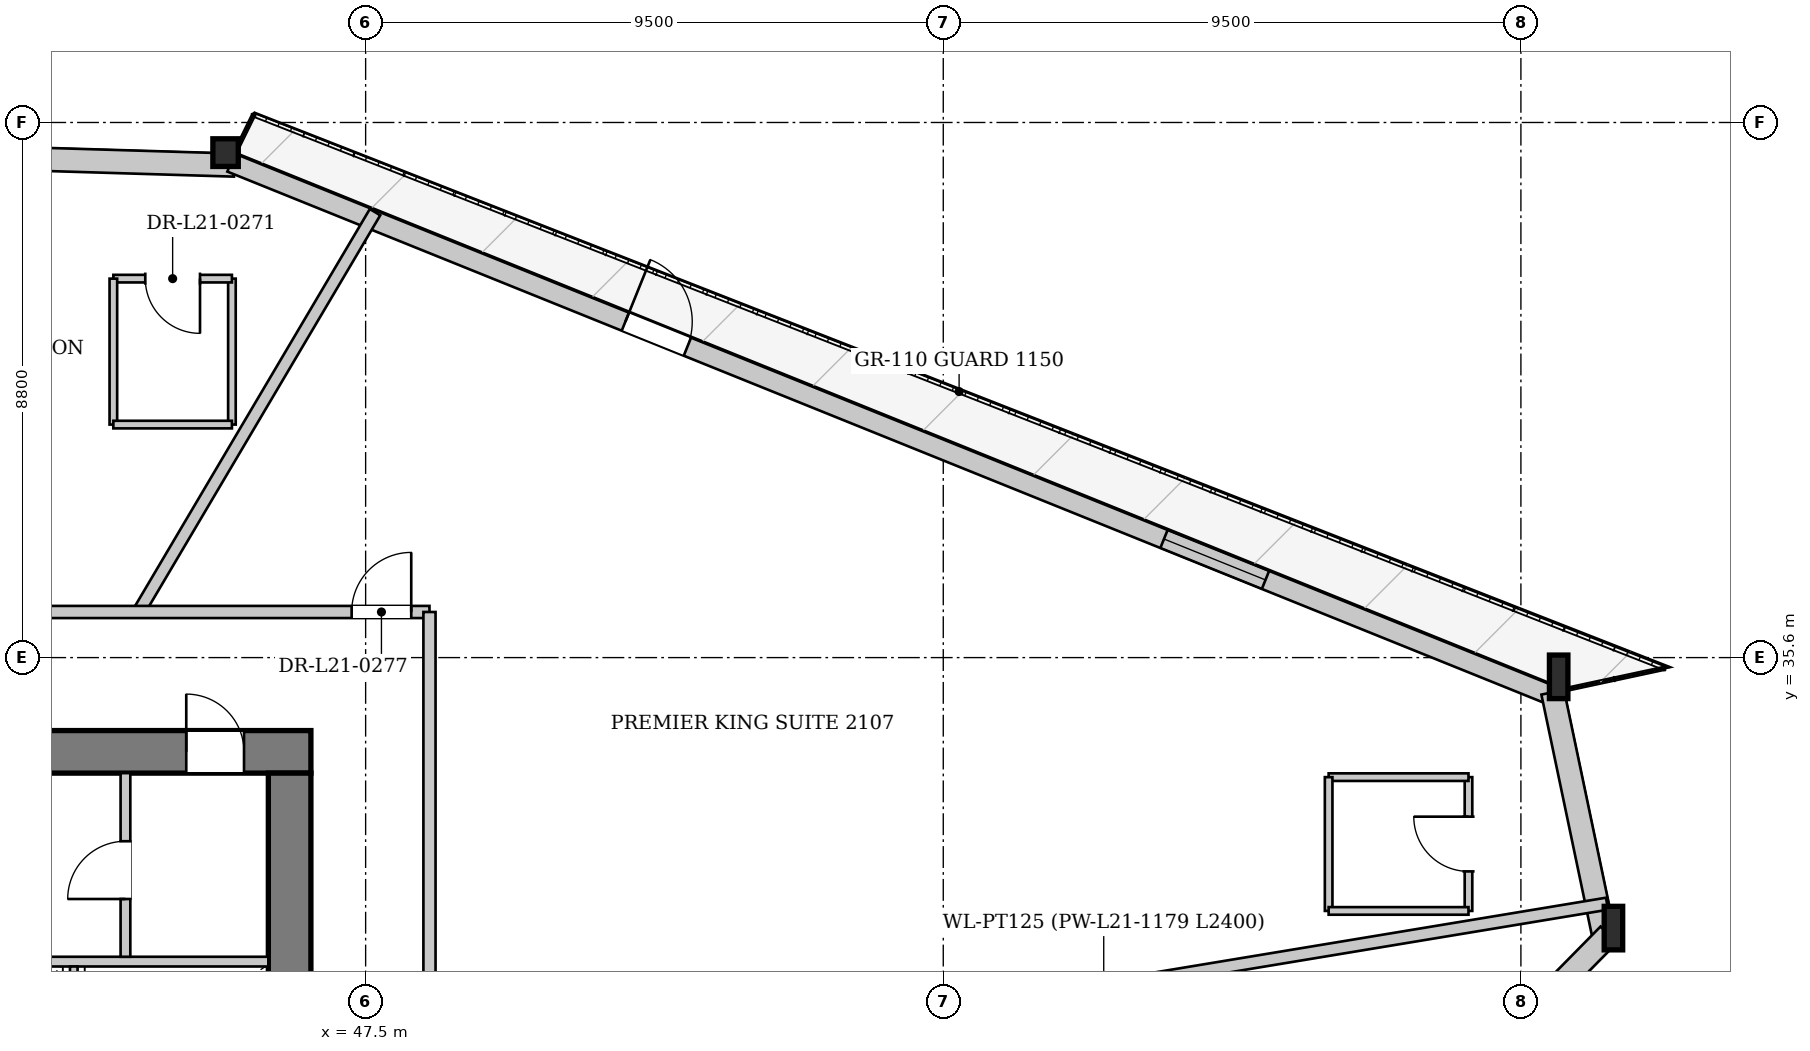
"""IFC4 building model, lengths in metres.
Left out: names, types, materials, properties, quantities, classifications, styles, units other than length and angle.
Written with IfcOpenShell. Run it as: python <this file> out.ifc"""

import sys

from ifc_helpers import new_model, si_unit, direction, frame, frame_2d, origin, origin_2d, place, context, subcontext, project, spatial, rectangle, i_section, extrude, source, transform, mapped, element, fill, save


model = new_model("IFC4")
c1 = context("Model", 3, precision=1e-05, world=origin(), true_north=direction((0.0, 1.0)))
c2 = subcontext(c1, "Body", "Model", "MODEL_VIEW")
j1 = project(units=[si_unit("LENGTHUNIT", "METRE"), si_unit("PLANEANGLEUNIT", "RADIAN")], contexts=[c1])
p1 = place(None, origin())
s1 = spatial("IfcSite", under=j1, at=p1, CompositionType="ELEMENT")
p2 = place(p1, origin())
s2 = spatial("IfcBuilding", under=s1, at=p2, CompositionType="ELEMENT")
p3 = place(p2, frame((0.0, 0.0, 84.4)))
s3 = spatial("IfcBuildingStorey", under=s2, at=p3, CompositionType="ELEMENT", Elevation=84.4)
m1 = source(origin(), c2, "Body", "SweptSolid", [
    extrude(i_section(OverallWidth=0.304, OverallDepth=0.716, WebThickness=0.021, FlangeThickness=0.04, at=origin_2d()), origin(), (0.0, 0.0, 1.0), 3.421),
])
p4 = place(p3, frame((68.081, 30.911, 0.0), z_axis=(-0.034755185422, 0.140376693481, 0.989487979216), x_axis=(-0.970691537398, -0.240328814801, 0.0)))
e1 = element("IfcColumn", 1, at=p4, inside=s3, PredefinedType="COLUMN", context=c2, shape_type="MappedRepresentation", body=[
    mapped(m1, transform((0.0, 0.0, 0.0), x_axis=(1.0, 0.0, 0.0), y_axis=(0.0, 1.0, 0.0), z_axis=(0.0, 0.0, 1.0), scale=1.0)),
])
m2 = source(origin(), c2, "Body", "SweptSolid", [
    extrude(i_section(OverallWidth=0.304, OverallDepth=0.716, WebThickness=0.021, FlangeThickness=0.04, at=origin_2d()), origin(), (0.0, 0.0, 1.0), 3.417),
])
p5 = place(p3, frame((67.209, 35.069, 0.0), z_axis=(-0.051377824628, 0.12555053946, 0.990755964493), x_axis=(-0.925504996746, -0.378735397075, 0.0)))
e2 = element("IfcColumn", 2, at=p5, inside=s3, PredefinedType="COLUMN", context=c2, shape_type="MappedRepresentation", body=[
    mapped(m2, transform((0.0, 0.0, 0.0), x_axis=(1.0, 0.0, 0.0), y_axis=(0.0, 1.0, 0.0), z_axis=(0.0, 0.0, 1.0), scale=1.0)),
])
m3 = source(origin(), c2, "Body", "SweptSolid", [
    extrude(i_section(OverallWidth=0.418, OverallDepth=0.455, WebThickness=0.038, FlangeThickness=0.059, at=origin_2d()), origin(), (0.0, 0.0, 1.0), 3.398),
])
p6 = place(p3, frame((45.345, 43.889, 0.0), z_axis=(-0.087649140389, 0.008980444712, 0.996110927458), x_axis=(-0.101925414299, -0.994792043555, 0.0)))
e3 = element("IfcColumn", 3, at=p6, inside=s3, PredefinedType="COLUMN", context=c2, shape_type="MappedRepresentation", body=[
    mapped(m3, transform((0.0, 0.0, 0.0), x_axis=(1.0, 0.0, 0.0), y_axis=(0.0, 1.0, 0.0), z_axis=(0.0, 0.0, 1.0), scale=1.0)),
])
p7 = place(p3, frame((21.775, 44.408, 0.0), z_axis=(0.0, 0.0, 1.0), x_axis=(0.999548013015, -0.030062762319, 0.0)))
e4 = element("IfcWall", 4, at=p7, inside=s3, PredefinedType="SOLIDWALL", context=c2, shape_type="SweptSolid", body=[
    extrude(rectangle(XDim=23.575, YDim=0.38, at=frame_2d((11.788, 0.0))), origin(), (0.0, 0.0, 1.0), 2.692),
])
p8 = place(p7, frame((5.501, 0.0, 0.322)))
e5 = element("IfcOpeningElement", 5, at=p8, cuts=e4, PredefinedType="OPENING", context=c2, shape_type="SweptSolid", body=[
    extrude(rectangle(XDim=2.2, YDim=2.25, at=frame_2d((1.1, 1.125))), frame((0.0, 0.2, 0.0), z_axis=(0.0, -1.0, 0.0), x_axis=(1.0, 0.0, 0.0)), (0.0, 0.0, 1.0), 0.4),
])
p9 = place(p7, frame((15.874, 0.0, 0.322)))
e6 = element("IfcOpeningElement", 6, at=p9, cuts=e4, PredefinedType="OPENING", context=c2, shape_type="SweptSolid", body=[
    extrude(rectangle(XDim=2.2, YDim=2.25, at=frame_2d((1.1, 1.125))), frame((0.0, 0.2, 0.0), z_axis=(0.0, -1.0, 0.0), x_axis=(1.0, 0.0, 0.0)), (0.0, 0.0, 1.0), 0.4),
])
p10 = place(p3, frame((45.286, 43.741, 0.0), z_axis=(0.0, 0.0, 1.0), x_axis=(0.927377791708, -0.374126223951, 0.0)))
e7 = element("IfcWall", 7, at=p10, inside=s3, PredefinedType="SOLIDWALL", context=c2, shape_type="SweptSolid", body=[
    extrude(rectangle(XDim=23.575, YDim=0.32, at=frame_2d((11.788, 0.0))), origin(), (0.0, 0.0, 1.0), 2.692),
])
p11 = place(p10, frame((6.994, 0.0, 0.0)))
e8 = element("IfcOpeningElement", 8, at=p11, cuts=e7, PredefinedType="OPENING", context=c2, shape_type="SweptSolid", body=[
    extrude(rectangle(XDim=1.1, YDim=2.3, at=frame_2d((0.55, 1.15))), frame((0.0, 0.17, 0.0), z_axis=(0.0, -1.0, 0.0), x_axis=(1.0, 0.0, 0.0)), (0.0, 0.0, 1.0), 0.34),
])
p12 = place(p10, frame((16.546, 0.0, 0.372)))
e9 = element("IfcOpeningElement", 9, at=p12, cuts=e7, PredefinedType="OPENING", context=c2, shape_type="SweptSolid", body=[
    extrude(rectangle(XDim=1.8, YDim=2.2, at=frame_2d((0.9, 1.1))), frame((0.0, 0.17, 0.0), z_axis=(0.0, -1.0, 0.0), x_axis=(1.0, 0.0, 0.0)), (0.0, 0.0, 1.0), 0.34),
])
p13 = place(p3, frame((67.023, 35.03, 0.0), z_axis=(0.0, 0.0, 1.0), x_axis=(0.205390638941, -0.978680073076, 0.0)))
e10 = element("IfcWall", 10, at=p13, inside=s3, PredefinedType="SOLIDWALL", context=c2, shape_type="SweptSolid", body=[
    extrude(rectangle(XDim=4.248, YDim=0.38, at=frame_2d((2.124, 0.0))), origin(), (0.0, 0.0, 1.0), 2.692),
])
p14 = place(p3, frame((67.946, 31.045, 0.0), z_axis=(0.0, 0.0, 1.0), x_axis=(-0.701949653056, -0.712226568288, 0.0)))
e11 = element("IfcWall", 11, at=p14, inside=s3, PredefinedType="SOLIDWALL", context=c2, shape_type="SweptSolid", body=[
    extrude(rectangle(XDim=24.184, YDim=0.38, at=frame_2d((12.092, 0.0))), origin(), (0.0, 0.0, 1.0), 2.692),
])
p15 = place(p14, frame((5.671, 0.0, 0.322)))
e12 = element("IfcOpeningElement", 12, at=p15, cuts=e11, PredefinedType="OPENING", context=c2, shape_type="SweptSolid", body=[
    extrude(rectangle(XDim=2.2, YDim=2.25, at=frame_2d((1.1, 1.125))), frame((0.0, 0.2, 0.0), z_axis=(0.0, -1.0, 0.0), x_axis=(1.0, 0.0, 0.0)), (0.0, 0.0, 1.0), 0.4),
])
p16 = place(p14, frame((16.312, 0.0, 0.322)))
e13 = element("IfcOpeningElement", 13, at=p16, cuts=e11, PredefinedType="OPENING", context=c2, shape_type="SweptSolid", body=[
    extrude(rectangle(XDim=2.2, YDim=2.25, at=frame_2d((1.1, 1.125))), frame((0.0, 0.2, 0.0), z_axis=(0.0, -1.0, 0.0), x_axis=(1.0, 0.0, 0.0)), (0.0, 0.0, 1.0), 0.4),
])
p17 = place(p3, frame((29.4, 34.05, 0.0), z_axis=(0.0, 0.0, 1.0), x_axis=(1.0, 0.0, 0.0)))
e14 = element("IfcWall", 14, at=p17, inside=s3, PredefinedType="SHEAR", context=c2, shape_type="SweptSolid", body=[
    extrude(rectangle(XDim=17.2, YDim=0.7, at=frame_2d((8.6, 0.0))), origin(), (0.0, 0.0, 1.0), 3.3),
])
p18 = place(p17, frame((1.7, 0.0, 0.0)))
e15 = element("IfcOpeningElement", 15, at=p18, cuts=e14, PredefinedType="OPENING", context=c2, shape_type="SweptSolid", body=[
    extrude(rectangle(XDim=0.95, YDim=2.1, at=frame_2d((0.475, 1.05))), frame((0.0, 0.36, 0.0), z_axis=(0.0, -1.0, 0.0), x_axis=(1.0, 0.0, 0.0)), (0.0, 0.0, 1.0), 0.72),
])
p19 = place(p17, frame((4.08, 0.0, 0.0)))
e16 = element("IfcOpeningElement", 16, at=p19, cuts=e14, PredefinedType="OPENING", context=c2, shape_type="SweptSolid", body=[
    extrude(rectangle(XDim=1.32, YDim=2.2, at=frame_2d((0.66, 1.1))), frame((0.0, 0.36, 0.0), z_axis=(0.0, -1.0, 0.0), x_axis=(1.0, 0.0, 0.0)), (0.0, 0.0, 1.0), 0.72),
])
p20 = place(p17, frame((15.15, 0.0, 0.0)))
e17 = element("IfcOpeningElement", 17, at=p20, cuts=e14, PredefinedType="OPENING", context=c2, shape_type="SweptSolid", body=[
    extrude(rectangle(XDim=0.95, YDim=2.1, at=frame_2d((0.475, 1.05))), frame((0.0, 0.36, 0.0), z_axis=(0.0, -1.0, 0.0), x_axis=(1.0, 0.0, 0.0)), (0.0, 0.0, 1.0), 0.72),
])
p21 = place(p3, frame((46.25, 33.7, 0.0), z_axis=(0.0, 0.0, 1.0), x_axis=(0.0, -1.0, 0.0)))
e18 = element("IfcWall", 18, at=p21, inside=s3, PredefinedType="SHEAR", context=c2, shape_type="SweptSolid", body=[
    extrude(rectangle(XDim=14.2, YDim=0.7, at=frame_2d((7.1, 0.0))), origin(), (0.0, 0.0, 1.0), 3.3),
])
p22 = place(p21, frame((5.18, 0.0, 0.0)))
e19 = element("IfcOpeningElement", 19, at=p22, cuts=e18, PredefinedType="OPENING", context=c2, shape_type="SweptSolid", body=[
    extrude(rectangle(XDim=1.6, YDim=2.2, at=frame_2d((0.8, 1.1))), frame((0.0, 0.36, 0.0), z_axis=(0.0, -1.0, 0.0), x_axis=(1.0, 0.0, 0.0)), (0.0, 0.0, 1.0), 0.72),
])
p23 = place(p3, frame((40.72, 30.6, 0.0), z_axis=(0.0, 0.0, 1.0), x_axis=(1.0, 0.0, 0.0)))
e20 = element("IfcWall", 20, at=p23, inside=s3, PredefinedType="PARTITIONING", context=c2, shape_type="SweptSolid", body=[
    extrude(rectangle(XDim=5.18, YDim=0.16, at=frame_2d((2.59, 0.0))), origin(), (0.0, 0.0, 1.0), 3.3),
])
p24 = place(p3, frame((42.7, 28.6, 0.0), z_axis=(0.0, 0.0, 1.0), x_axis=(0.0, 1.0, 0.0)))
e21 = element("IfcWall", 21, at=p24, inside=s3, PredefinedType="PARTITIONING", context=c2, shape_type="SweptSolid", body=[
    extrude(rectangle(XDim=1.92, YDim=0.125, at=frame_2d((0.96, 0.0))), origin(), (0.0, 0.0, 1.0), 3.3),
])
p25 = place(p3, frame((43.55, 30.68, 0.0), z_axis=(0.0, 0.0, 1.0), x_axis=(0.0, 1.0, 0.0)))
e22 = element("IfcWall", 22, at=p25, inside=s3, PredefinedType="PARTITIONING", context=c2, shape_type="SweptSolid", body=[
    extrude(rectangle(XDim=3.02, YDim=0.16, at=frame_2d((1.51, 0.0))), origin(), (0.0, 0.0, 1.0), 3.3),
])
p26 = place(p25, frame((0.95, 0.0, 0.0)))
e23 = element("IfcOpeningElement", 23, at=p26, cuts=e22, PredefinedType="OPENING", context=c2, shape_type="SweptSolid", body=[
    extrude(rectangle(XDim=0.95, YDim=2.1, at=frame_2d((0.475, 1.05))), frame((0.0, 0.09, 0.0), z_axis=(0.0, -1.0, 0.0), x_axis=(1.0, 0.0, 0.0)), (0.0, 0.0, 1.0), 0.18),
])
p27 = place(p3, frame((48.55, 28.346, 0.0), z_axis=(0.0, 0.0, 1.0), x_axis=(0.986571835932, 0.163327929471, 0.0)))
e24 = element("IfcWall", 24, at=p27, inside=s3, PredefinedType="PARTITIONING", context=c2, shape_type="SweptSolid", body=[
    extrude(rectangle(XDim=19.63, YDim=0.2, at=frame_2d((9.815, 0.0))), origin(), (0.0, 0.0, 1.0), 2.795),
])
p28 = place(p3, frame((43.766, 36.35, 0.0), z_axis=(0.0, 0.0, 1.0), x_axis=(0.509052298175, 0.860735591063, 0.0)))
e25 = element("IfcWall", 25, at=p28, inside=s3, PredefinedType="PARTITIONING", context=c2, shape_type="SweptSolid", body=[
    extrude(rectangle(XDim=7.639, YDim=0.2, at=frame_2d((3.82, 0.0))), origin(), (0.0, 0.0, 1.0), 3.3),
])
p29 = place(p3, frame((65.638, 31.434, 0.0), z_axis=(0.0, 0.0, 1.0), x_axis=(0.0, 1.0, 0.0)))
e26 = element("IfcWall", 26, at=p29, inside=s3, PredefinedType="PARTITIONING", context=c2, shape_type="SweptSolid", body=[
    extrude(rectangle(XDim=2.2, YDim=0.125, at=frame_2d((1.1, 0.0))), origin(), (0.0, 0.0, 1.0), 3.3),
])
p30 = place(p29, frame((0.65, 0.0, 0.0)))
e27 = element("IfcOpeningElement", 27, at=p30, cuts=e26, PredefinedType="OPENING", context=c2, shape_type="SweptSolid", body=[
    extrude(rectangle(XDim=0.9, YDim=2.1, at=frame_2d((0.45, 1.05))), frame((0.0, 0.073, 0.0), z_axis=(0.0, -1.0, 0.0), x_axis=(1.0, 0.0, 0.0)), (0.0, 0.0, 1.0), 0.145),
])
p31 = place(p3, frame((65.638, 33.634, 0.0), z_axis=(0.0, 0.0, 1.0), x_axis=(-1.0, 0.0, 0.0)))
e28 = element("IfcWall", 28, at=p31, inside=s3, PredefinedType="PARTITIONING", context=c2, shape_type="SweptSolid", body=[
    extrude(rectangle(XDim=2.3, YDim=0.125, at=frame_2d((1.15, 0.0))), origin(), (0.0, 0.0, 1.0), 3.3),
])
p32 = place(p3, frame((63.338, 33.634, 0.0), z_axis=(0.0, 0.0, 1.0), x_axis=(0.0, -1.0, 0.0)))
e29 = element("IfcWall", 29, at=p32, inside=s3, PredefinedType="PARTITIONING", context=c2, shape_type="SweptSolid", body=[
    extrude(rectangle(XDim=2.2, YDim=0.125, at=frame_2d((1.1, 0.0))), origin(), (0.0, 0.0, 1.0), 3.3),
])
p33 = place(p3, frame((63.338, 31.434, 0.0), z_axis=(0.0, 0.0, 1.0), x_axis=(1.0, 0.0, 0.0)))
e30 = element("IfcWall", 30, at=p33, inside=s3, PredefinedType="PARTITIONING", context=c2, shape_type="SweptSolid", body=[
    extrude(rectangle(XDim=2.3, YDim=0.125, at=frame_2d((1.15, 0.0))), origin(), (0.0, 0.0, 1.0), 3.3),
])
p34 = place(p3, frame((45.301, 39.432, 0.0), z_axis=(0.0, 0.0, 1.0), x_axis=(0.0, 1.0, 0.0)))
e31 = element("IfcWall", 31, at=p34, inside=s3, PredefinedType="PARTITIONING", context=c2, shape_type="SweptSolid", body=[
    extrude(rectangle(XDim=2.4, YDim=0.125, at=frame_2d((1.2, 0.0))), origin(), (0.0, 0.0, 1.0), 3.3),
])
p35 = place(p3, frame((45.301, 41.832, 0.0), z_axis=(0.0, 0.0, 1.0), x_axis=(-1.0, 0.0, 0.0)))
e32 = element("IfcWall", 32, at=p35, inside=s3, PredefinedType="PARTITIONING", context=c2, shape_type="SweptSolid", body=[
    extrude(rectangle(XDim=1.95, YDim=0.125, at=frame_2d((0.975, 0.0))), origin(), (0.0, 0.0, 1.0), 3.3),
])
p36 = place(p35, frame((0.525, 0.0, 0.0)))
e33 = element("IfcOpeningElement", 33, at=p36, cuts=e32, PredefinedType="OPENING", context=c2, shape_type="SweptSolid", body=[
    extrude(rectangle(XDim=0.9, YDim=2.1, at=frame_2d((0.45, 1.05))), frame((0.0, 0.073, 0.0), z_axis=(0.0, -1.0, 0.0), x_axis=(1.0, 0.0, 0.0)), (0.0, 0.0, 1.0), 0.145),
])
p37 = place(p3, frame((43.351, 41.832, 0.0), z_axis=(0.0, 0.0, 1.0), x_axis=(0.0, -1.0, 0.0)))
e34 = element("IfcWall", 34, at=p37, inside=s3, PredefinedType="PARTITIONING", context=c2, shape_type="SweptSolid", body=[
    extrude(rectangle(XDim=2.4, YDim=0.125, at=frame_2d((1.2, 0.0))), origin(), (0.0, 0.0, 1.0), 2.785),
])
p38 = place(p3, frame((43.351, 39.432, 0.0), z_axis=(0.0, 0.0, 1.0), x_axis=(1.0, 0.0, 0.0)))
e35 = element("IfcWall", 35, at=p38, inside=s3, PredefinedType="PARTITIONING", context=c2, shape_type="SweptSolid", body=[
    extrude(rectangle(XDim=1.95, YDim=0.125, at=frame_2d((0.975, 0.0))), origin(), (0.0, 0.0, 1.0), 2.925),
])
p39 = place(p3, frame((27.45, 36.35, 0.0), z_axis=(0.0, 0.0, 1.0), x_axis=(1.0, 0.0, 0.0)))
e36 = element("IfcWall", 36, at=p39, inside=s3, PredefinedType="PARTITIONING", context=c2, shape_type="SweptSolid", body=[
    extrude(rectangle(XDim=21.1, YDim=0.2, at=frame_2d((10.55, 0.0))), origin(), (0.0, 0.0, 1.0), 3.3),
])
p40 = place(p39, frame((2.092, 0.0, 0.0)))
e37 = element("IfcOpeningElement", 37, at=p40, cuts=e36, PredefinedType="OPENING", context=c2, shape_type="SweptSolid", body=[
    extrude(rectangle(XDim=0.98, YDim=2.15, at=frame_2d((0.49, 1.075))), frame((0.0, 0.11, 0.0), z_axis=(0.0, -1.0, 0.0), x_axis=(1.0, 0.0, 0.0)), (0.0, 0.0, 1.0), 0.22),
])
p41 = place(p39, frame((19.82, 0.0, 0.0)))
e38 = element("IfcOpeningElement", 38, at=p41, cuts=e36, PredefinedType="OPENING", context=c2, shape_type="SweptSolid", body=[
    extrude(rectangle(XDim=0.98, YDim=2.15, at=frame_2d((0.49, 1.075))), frame((0.0, 0.11, 0.0), z_axis=(0.0, -1.0, 0.0), x_axis=(1.0, 0.0, 0.0)), (0.0, 0.0, 1.0), 0.22),
])
p42 = place(p39, frame((12.032, 0.0, 0.0)))
e39 = element("IfcOpeningElement", 39, at=p42, cuts=e36, PredefinedType="OPENING", context=c2, shape_type="SweptSolid", body=[
    extrude(rectangle(XDim=0.98, YDim=2.15, at=frame_2d((0.49, 1.075))), frame((0.0, 0.11, 0.0), z_axis=(0.0, -1.0, 0.0), x_axis=(1.0, 0.0, 0.0)), (0.0, 0.0, 1.0), 0.22),
])
p43 = place(p3, frame((48.55, 16.85, 0.0), z_axis=(0.0, 0.0, 1.0), x_axis=(0.0, 1.0, 0.0)))
e40 = element("IfcWall", 40, at=p43, inside=s3, PredefinedType="PARTITIONING", context=c2, shape_type="SweptSolid", body=[
    extrude(rectangle(XDim=19.5, YDim=0.2, at=frame_2d((9.75, 0.0))), origin(), (0.0, 0.0, 1.0), 3.3),
])
p44 = place(p43, frame((4.972, 0.0, 0.0)))
e41 = element("IfcOpeningElement", 41, at=p44, cuts=e40, PredefinedType="OPENING", context=c2, shape_type="SweptSolid", body=[
    extrude(rectangle(XDim=0.98, YDim=2.15, at=frame_2d((0.49, 1.075))), frame((0.0, 0.11, 0.0), z_axis=(0.0, -1.0, 0.0), x_axis=(1.0, 0.0, 0.0)), (0.0, 0.0, 1.0), 0.22),
])
m4 = source(origin(), c2, "Body", "SweptSolid", [
    extrude(rectangle(XDim=1.1, YDim=2.3, at=frame_2d((0.55, 1.15))), frame((0.0, 0.025, 0.0), z_axis=(0.0, -1.0, 0.0), x_axis=(1.0, 0.0, 0.0)), (0.0, 0.0, 1.0), 0.05),
])
p45 = place(p11, origin())
e42 = element("IfcDoor", 42, at=p45, inside=s3, OperationType="SINGLE_SWING_LEFT", PredefinedType="DOOR", context=c2, shape_type="MappedRepresentation", body=[
    mapped(m4, transform((0.0, 0.0, 0.0), x_axis=(1.0, 0.0, 0.0), y_axis=(0.0, 1.0, 0.0), z_axis=(0.0, 0.0, 1.0), scale=1.0)),
])
fill(e8, e42)
m5 = source(origin(), c2, "Body", "SweptSolid", [
    extrude(rectangle(XDim=1.8, YDim=2.2, at=frame_2d((0.9, 1.1))), frame((0.0, 0.03, 0.0), z_axis=(0.0, -1.0, 0.0), x_axis=(1.0, 0.0, 0.0)), (0.0, 0.0, 1.0), 0.06),
])
p46 = place(p12, origin())
e43 = element("IfcWindow", 43, at=p46, inside=s3, PartitioningType="SINGLE_PANEL", PredefinedType="WINDOW", context=c2, shape_type="MappedRepresentation", body=[
    mapped(m5, transform((0.0, 0.0, 0.0), x_axis=(1.0, 0.0, 0.0), y_axis=(0.0, 1.0, 0.0), z_axis=(0.0, 0.0, 1.0), scale=1.0)),
])
fill(e9, e43)
m6 = source(origin(), c2, "Body", "SweptSolid", [
    extrude(rectangle(XDim=0.95, YDim=2.1, at=frame_2d((0.475, 1.05))), frame((0.0, 0.025, 0.0), z_axis=(0.0, -1.0, 0.0), x_axis=(1.0, 0.0, 0.0)), (0.0, 0.0, 1.0), 0.05),
])
p47 = place(p26, origin())
e44 = element("IfcDoor", 44, at=p47, inside=s3, OperationType="SINGLE_SWING_LEFT", PredefinedType="DOOR", context=c2, shape_type="MappedRepresentation", body=[
    mapped(m6, transform((0.0, 0.0, 0.0), x_axis=(1.0, 0.0, 0.0), y_axis=(0.0, 1.0, 0.0), z_axis=(0.0, 0.0, 1.0), scale=1.0)),
])
fill(e23, e44)
p48 = place(p20, origin())
e45 = element("IfcDoor", 45, at=p48, inside=s3, OperationType="SINGLE_SWING_LEFT", PredefinedType="DOOR", context=c2, shape_type="MappedRepresentation", body=[
    mapped(m6, transform((0.0, 0.0, 0.0), x_axis=(1.0, 0.0, 0.0), y_axis=(0.0, 1.0, 0.0), z_axis=(0.0, 0.0, 1.0), scale=1.0)),
])
fill(e17, e45)
m7 = source(origin(), c2, "Body", "SweptSolid", [
    extrude(rectangle(XDim=0.9, YDim=2.1, at=frame_2d((0.45, 1.05))), frame((0.0, 0.025, 0.0), z_axis=(0.0, -1.0, 0.0), x_axis=(1.0, 0.0, 0.0)), (0.0, 0.0, 1.0), 0.05),
])
p49 = place(p30, origin())
e46 = element("IfcDoor", 46, at=p49, inside=s3, OperationType="SINGLE_SWING_RIGHT", PredefinedType="DOOR", context=c2, shape_type="MappedRepresentation", body=[
    mapped(m7, transform((0.0, 0.0, 0.0), x_axis=(1.0, 0.0, 0.0), y_axis=(0.0, 1.0, 0.0), z_axis=(0.0, 0.0, 1.0), scale=1.0)),
])
fill(e27, e46)
p50 = place(p36, origin())
e47 = element("IfcDoor", 47, at=p50, inside=s3, OperationType="SINGLE_SWING_LEFT", PredefinedType="DOOR", context=c2, shape_type="MappedRepresentation", body=[
    mapped(m7, transform((0.0, 0.0, 0.0), x_axis=(1.0, 0.0, 0.0), y_axis=(0.0, 1.0, 0.0), z_axis=(0.0, 0.0, 1.0), scale=1.0)),
])
fill(e33, e47)
m8 = source(origin(), c2, "Body", "SweptSolid", [
    extrude(rectangle(XDim=0.98, YDim=2.15, at=frame_2d((0.49, 1.075))), frame((0.0, 0.025, 0.0), z_axis=(0.0, -1.0, 0.0), x_axis=(1.0, 0.0, 0.0)), (0.0, 0.0, 1.0), 0.05),
])
p51 = place(p41, origin())
e48 = element("IfcDoor", 48, at=p51, inside=s3, OperationType="SINGLE_SWING_RIGHT", PredefinedType="DOOR", context=c2, shape_type="MappedRepresentation", body=[
    mapped(m8, transform((0.0, 0.0, 0.0), x_axis=(1.0, 0.0, 0.0), y_axis=(0.0, 1.0, 0.0), z_axis=(0.0, 0.0, 1.0), scale=1.0)),
])
fill(e38, e48)
save(model, sys.argv[1])
